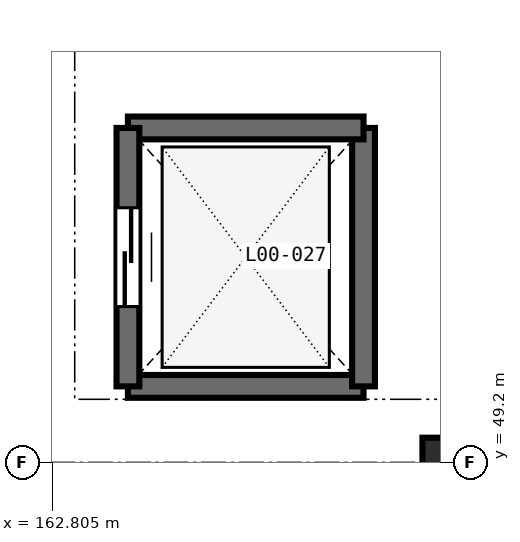
"""IFC4 building model, lengths in metres.
Left out: names, types, materials, properties, quantities, classifications, styles, units other than length and angle.
Written with IfcOpenShell. Run it as: python <this file> out.ifc"""

import sys

from ifc_helpers import new_model, si_unit, direction, frame, frame_2d, origin, origin_2d, place, context, subcontext, project, spatial, rectangle, extrude, element, fill, save


model = new_model("IFC4")
c1 = context("Model", 3, precision=1e-05, world=origin(), true_north=direction((0.0, 1.0)))
c2 = subcontext(c1, "Body", "Model", "MODEL_VIEW")
j1 = project(units=[si_unit("LENGTHUNIT", "METRE"), si_unit("PLANEANGLEUNIT", "RADIAN")], contexts=[c1])
p1 = place(None, origin())
s1 = spatial("IfcSite", under=j1, at=p1, CompositionType="ELEMENT")
p2 = place(p1, origin())
s2 = spatial("IfcBuilding", under=s1, at=p2, CompositionType="ELEMENT")
p3 = place(p2, origin())
s3 = spatial("IfcBuildingStorey", under=s2, at=p3, CompositionType="ELEMENT", Elevation=0.0)
p4 = place(p3, frame((168.0, 49.2, 0.0), z_axis=(0.0, 0.0, 1.0), x_axis=(1.0, 0.0, 0.0)))
e1 = element("IfcColumn", 1, at=p4, inside=s3, PredefinedType="COLUMN", context=c2, shape_type="SweptSolid", body=[
    extrude(rectangle(XDim=0.65, YDim=0.65, at=origin_2d()), origin(), (0.0, 0.0, 1.0), 5.4),
])
p5 = place(p3, frame((163.8, 50.2, 0.0), z_axis=(0.0, 0.0, 1.0), x_axis=(1.0, 0.0, 0.0)))
e2 = element("IfcWall", 2, at=p5, inside=s3, PredefinedType="SHEAR", context=c2, shape_type="SweptSolid", body=[
    extrude(rectangle(XDim=3.1, YDim=0.3, at=frame_2d((1.55, 0.0))), origin(), (0.0, 0.0, 1.0), 5.4),
])
p6 = place(p3, frame((166.9, 50.2, 0.0), z_axis=(0.0, 0.0, 1.0), x_axis=(0.0, 1.0, 0.0)))
e3 = element("IfcWall", 3, at=p6, inside=s3, PredefinedType="SHEAR", context=c2, shape_type="SweptSolid", body=[
    extrude(rectangle(XDim=3.4, YDim=0.3, at=frame_2d((1.7, 0.0))), origin(), (0.0, 0.0, 1.0), 5.4),
])
p7 = place(p3, frame((166.9, 53.6, 0.0), z_axis=(0.0, 0.0, 1.0), x_axis=(-1.0, 0.0, 0.0)))
e4 = element("IfcWall", 4, at=p7, inside=s3, PredefinedType="SHEAR", context=c2, shape_type="SweptSolid", body=[
    extrude(rectangle(XDim=3.1, YDim=0.3, at=frame_2d((1.55, 0.0))), origin(), (0.0, 0.0, 1.0), 5.4),
])
p8 = place(p3, frame((163.8, 53.6, 0.0), z_axis=(0.0, 0.0, 1.0), x_axis=(0.0, -1.0, 0.0)))
e5 = element("IfcWall", 5, at=p8, inside=s3, PredefinedType="SHEAR", context=c2, shape_type="SweptSolid", body=[
    extrude(rectangle(XDim=3.4, YDim=0.3, at=frame_2d((1.7, 0.0))), origin(), (0.0, 0.0, 1.0), 5.4),
])
p9 = place(p8, frame((1.05, 0.0, 0.0)))
e6 = element("IfcOpeningElement", 6, at=p9, cuts=e5, PredefinedType="OPENING", context=c2, shape_type="SweptSolid", body=[
    extrude(rectangle(XDim=1.3, YDim=2.2, at=frame_2d((0.65, 1.1))), frame((0.0, 0.16, 0.0), z_axis=(0.0, -1.0, 0.0), x_axis=(1.0, 0.0, 0.0)), (0.0, 0.0, 1.0), 0.32),
])
p10 = place(p9, origin())
e7 = element("IfcDoor", 7, at=p10, inside=s3, OperationType="DOUBLE_DOOR_SLIDING", PredefinedType="DOOR", context=c2, shape_type="SweptSolid", body=[
    extrude(rectangle(XDim=1.3, YDim=2.2, at=frame_2d((0.65, 1.1))), frame((0.0, 0.025, 0.0), z_axis=(0.0, -1.0, 0.0), x_axis=(1.0, 0.0, 0.0)), (0.0, 0.0, 1.0), 0.05),
])
fill(e6, e7)
save(model, sys.argv[1])
